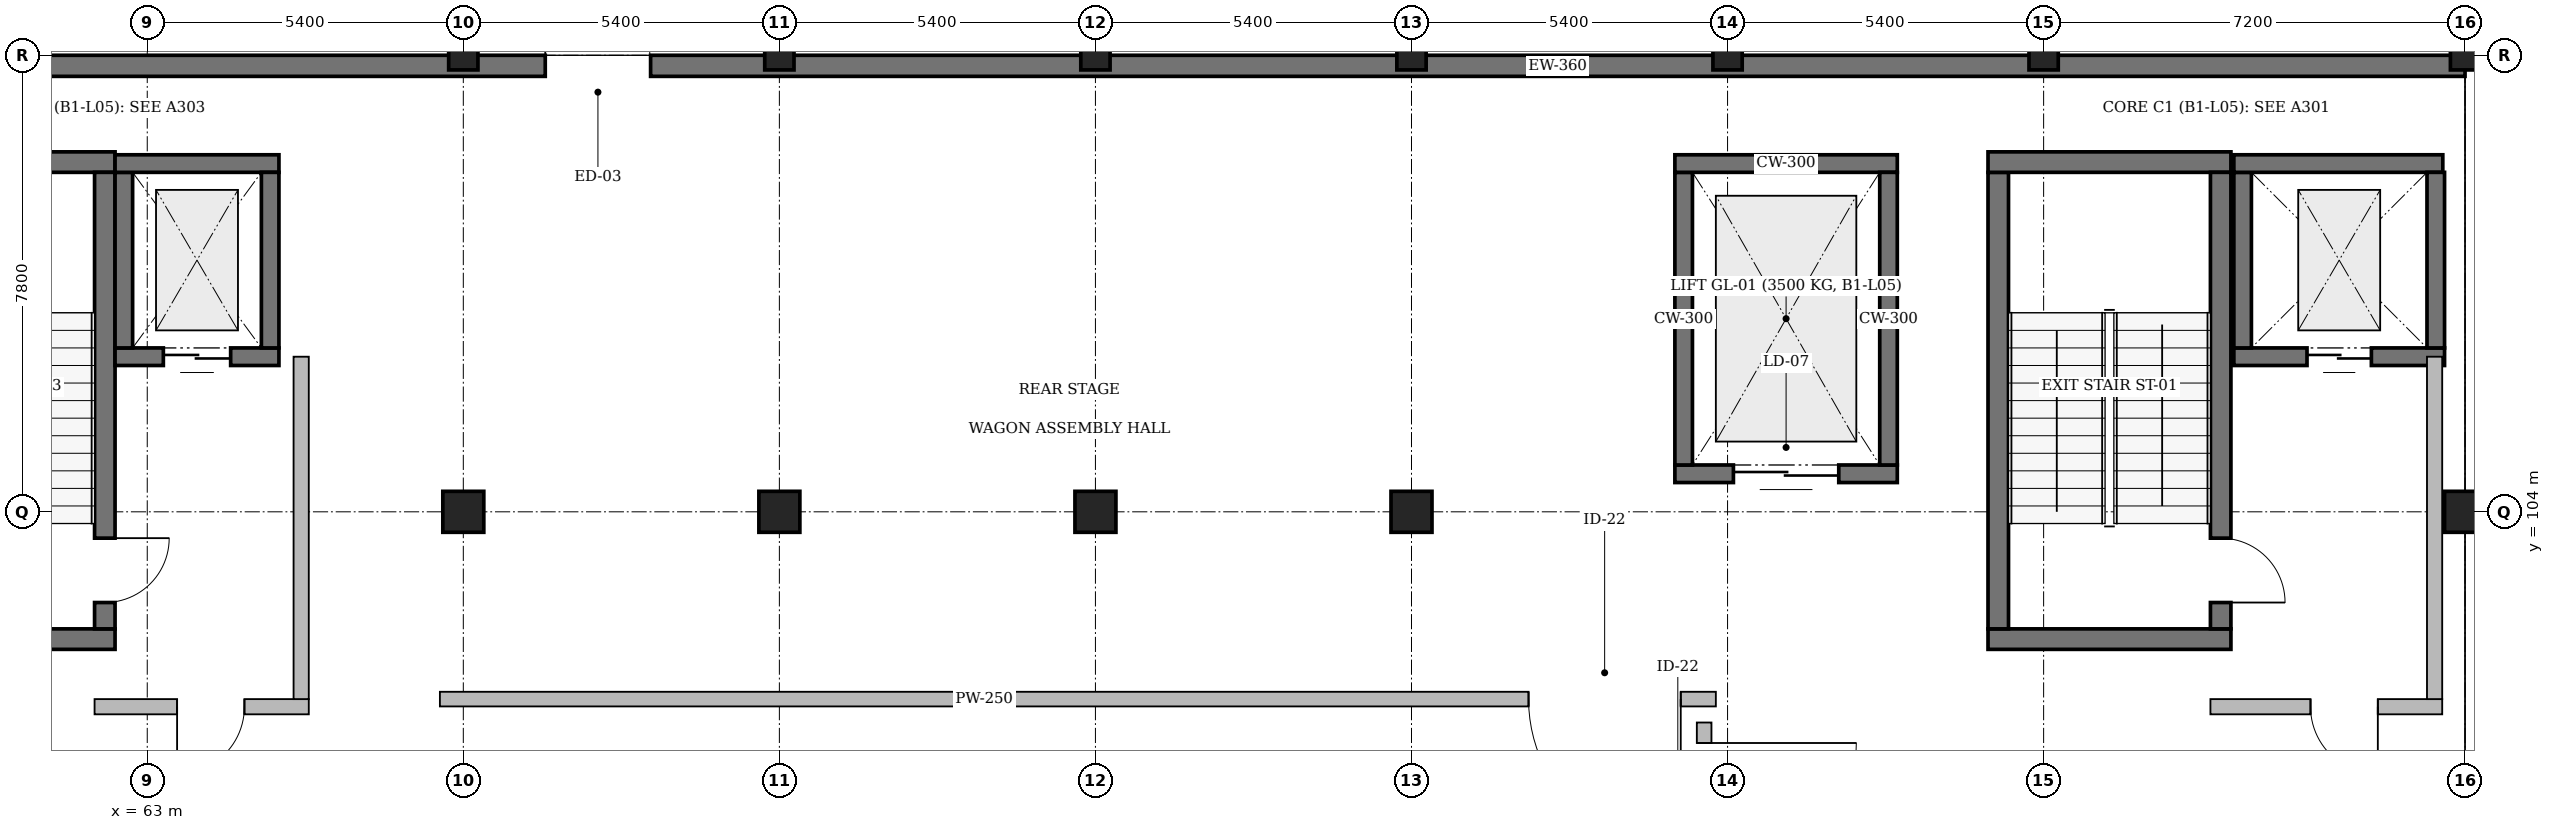
"""IFC4 building model, lengths in metres.
Left out: names, types, materials, properties, quantities, classifications, styles, units other than length and angle.
Written with IfcOpenShell. Run it as: python <this file> out.ifc"""

import sys

from ifc_helpers import new_model, si_unit, direction, frame, frame_2d, origin, origin_2d, place, context, subcontext, project, spatial, rectangle, extrude, element, fill, save


model = new_model("IFC4")
c1 = context("Model", 3, precision=1e-05, world=origin(), true_north=direction((0.0, 1.0)))
c2 = subcontext(c1, "Body", "Model", "MODEL_VIEW")
j1 = project(units=[si_unit("LENGTHUNIT", "METRE"), si_unit("PLANEANGLEUNIT", "RADIAN")], contexts=[c1])
p1 = place(None, origin())
s1 = spatial("IfcSite", under=j1, at=p1, CompositionType="ELEMENT")
p2 = place(p1, origin())
s2 = spatial("IfcBuilding", under=s1, at=p2, CompositionType="ELEMENT")
p3 = place(p2, origin())
s3 = spatial("IfcBuildingStorey", under=s2, at=p3, CompositionType="ELEMENT", Elevation=0.0)
p4 = place(p3, frame((68.4, 104.0, 0.0), z_axis=(0.0, 0.0, 1.0), x_axis=(1.0, 0.0, 0.0)))
e1 = element("IfcColumn", 1, at=p4, inside=s3, PredefinedType="COLUMN", context=c2, shape_type="SweptSolid", body=[
    extrude(rectangle(XDim=0.7, YDim=0.7, at=origin_2d()), origin(), (0.0, 0.0, 1.0), 4.8),
])
p5 = place(p3, frame((68.4, 111.8, 0.0), z_axis=(0.0, 0.0, 1.0), x_axis=(1.0, 0.0, 0.0)))
e2 = element("IfcColumn", 2, at=p5, inside=s3, PredefinedType="COLUMN", context=c2, shape_type="SweptSolid", body=[
    extrude(rectangle(XDim=0.5, YDim=0.5, at=origin_2d()), origin(), (0.0, 0.0, 1.0), 4.8),
])
p6 = place(p3, frame((73.8, 104.0, 0.0), z_axis=(0.0, 0.0, 1.0), x_axis=(1.0, 0.0, 0.0)))
e3 = element("IfcColumn", 3, at=p6, inside=s3, PredefinedType="COLUMN", context=c2, shape_type="SweptSolid", body=[
    extrude(rectangle(XDim=0.7, YDim=0.7, at=origin_2d()), origin(), (0.0, 0.0, 1.0), 4.8),
])
p7 = place(p3, frame((73.8, 111.8, 0.0), z_axis=(0.0, 0.0, 1.0), x_axis=(1.0, 0.0, 0.0)))
e4 = element("IfcColumn", 4, at=p7, inside=s3, PredefinedType="COLUMN", context=c2, shape_type="SweptSolid", body=[
    extrude(rectangle(XDim=0.5, YDim=0.5, at=origin_2d()), origin(), (0.0, 0.0, 1.0), 4.8),
])
p8 = place(p3, frame((79.2, 104.0, 0.0), z_axis=(0.0, 0.0, 1.0), x_axis=(1.0, 0.0, 0.0)))
e5 = element("IfcColumn", 5, at=p8, inside=s3, PredefinedType="COLUMN", context=c2, shape_type="SweptSolid", body=[
    extrude(rectangle(XDim=0.7, YDim=0.7, at=origin_2d()), origin(), (0.0, 0.0, 1.0), 4.8),
])
p9 = place(p3, frame((79.2, 111.8, 0.0), z_axis=(0.0, 0.0, 1.0), x_axis=(1.0, 0.0, 0.0)))
e6 = element("IfcColumn", 6, at=p9, inside=s3, PredefinedType="COLUMN", context=c2, shape_type="SweptSolid", body=[
    extrude(rectangle(XDim=0.5, YDim=0.5, at=origin_2d()), origin(), (0.0, 0.0, 1.0), 4.8),
])
p10 = place(p3, frame((84.6, 104.0, 0.0), z_axis=(0.0, 0.0, 1.0), x_axis=(1.0, 0.0, 0.0)))
e7 = element("IfcColumn", 7, at=p10, inside=s3, PredefinedType="COLUMN", context=c2, shape_type="SweptSolid", body=[
    extrude(rectangle(XDim=0.7, YDim=0.7, at=origin_2d()), origin(), (0.0, 0.0, 1.0), 4.8),
])
for number, where, z_axis, x_axis in (
    (8, (84.6, 111.8, 0.0), (0.0, 0.0, 1.0), (1.0, 0.0, 0.0)),
    (9, (90.0, 111.8, 0.0), (0.0, 0.0, 1.0), (1.0, 0.0, 0.0)),
    (10, (95.4, 111.8, 0.0), (0.0, 0.0, 1.0), (1.0, 0.0, 0.0)),
):
    element("IfcColumn", number, at=place(p3, frame(where, z_axis=z_axis, x_axis=x_axis)), inside=s3, PredefinedType="COLUMN", context=c2, shape_type="SweptSolid", body=[
        extrude(rectangle(XDim=0.5, YDim=0.5, at=origin_2d()), origin(), (0.0, 0.0, 1.0), 4.8),
    ])
p11 = place(p3, frame((102.6, 104.0, 0.0), z_axis=(0.0, 0.0, 1.0), x_axis=(1.0, 0.0, 0.0)))
e11 = element("IfcColumn", 11, at=p11, inside=s3, PredefinedType="COLUMN", context=c2, shape_type="SweptSolid", body=[
    extrude(rectangle(XDim=0.7, YDim=0.7, at=origin_2d()), origin(), (0.0, 0.0, 1.0), 4.8),
])
p12 = place(p3, frame((102.6, 111.8, 0.0), z_axis=(0.0, 0.0, 1.0), x_axis=(1.0, 0.0, 0.0)))
e12 = element("IfcColumn", 12, at=p12, inside=s3, PredefinedType="COLUMN", context=c2, shape_type="SweptSolid", body=[
    extrude(rectangle(XDim=0.5, YDim=0.5, at=origin_2d()), origin(), (0.0, 0.0, 1.0), 4.8),
])
p13 = place(p3, frame((98.6, 101.825, 0.0), z_axis=(0.0, 0.0, 1.0), x_axis=(-1.0, 0.0, 0.0)))
e13 = element("IfcWall", 13, at=p13, inside=s3, PredefinedType="SOLIDWALL", context=c2, shape_type="SweptSolid", body=[
    extrude(rectangle(XDim=4.15, YDim=0.35, at=frame_2d((2.075, 0.0))), origin(), (0.0, 0.0, 1.0), 4.8),
])
p14 = place(p3, frame((94.625, 102.0, 0.0), z_axis=(0.0, 0.0, 1.0), x_axis=(0.0, 1.0, 0.0)))
e14 = element("IfcWall", 14, at=p14, inside=s3, PredefinedType="SOLIDWALL", context=c2, shape_type="SweptSolid", body=[
    extrude(rectangle(XDim=7.8, YDim=0.35, at=frame_2d((3.9, 0.0))), origin(), (0.0, 0.0, 1.0), 4.8),
])
p15 = place(p3, frame((94.45, 109.975, 0.0), z_axis=(0.0, 0.0, 1.0), x_axis=(1.0, 0.0, 0.0)))
e15 = element("IfcWall", 15, at=p15, inside=s3, PredefinedType="SOLIDWALL", context=c2, shape_type="SweptSolid", body=[
    extrude(rectangle(XDim=4.15, YDim=0.35, at=frame_2d((2.075, 0.0))), origin(), (0.0, 0.0, 1.0), 4.8),
])
p16 = place(p3, frame((98.425, 109.8, 0.0), z_axis=(0.0, 0.0, 1.0), x_axis=(0.0, -1.0, 0.0)))
e16 = element("IfcWall", 16, at=p16, inside=s3, PredefinedType="SOLIDWALL", context=c2, shape_type="SweptSolid", body=[
    extrude(rectangle(XDim=7.8, YDim=0.35, at=frame_2d((3.9, 0.0))), origin(), (0.0, 0.0, 1.0), 4.8),
])
p17 = place(p16, frame((6.25, 0.0, 0.0)))
e17 = element("IfcOpeningElement", 17, at=p17, cuts=e16, PredefinedType="OPENING", context=c2, shape_type="SweptSolid", body=[
    extrude(rectangle(XDim=1.1, YDim=2.15, at=frame_2d((0.55, 1.075))), frame((0.0, 0.195, 0.0), z_axis=(0.0, -1.0, 0.0), x_axis=(1.0, 0.0, 0.0)), (0.0, 0.0, 1.0), 0.39),
])
p18 = place(p3, frame((102.25, 106.65, 0.0), z_axis=(0.0, 0.0, 1.0), x_axis=(-1.0, 0.0, 0.0)))
e18 = element("IfcWall", 18, at=p18, inside=s3, PredefinedType="SOLIDWALL", context=c2, shape_type="SweptSolid", body=[
    extrude(rectangle(XDim=3.6, YDim=0.3, at=frame_2d((1.8, 0.0))), origin(), (0.0, 0.0, 1.0), 4.8),
])
p19 = place(p18, frame((1.25, 0.0, 0.0)))
e19 = element("IfcOpeningElement", 19, at=p19, cuts=e18, PredefinedType="OPENING", context=c2, shape_type="SweptSolid", body=[
    extrude(rectangle(XDim=1.1, YDim=2.1, at=frame_2d((0.55, 1.05))), frame((0.0, 0.17, 0.0), z_axis=(0.0, -1.0, 0.0), x_axis=(1.0, 0.0, 0.0)), (0.0, 0.0, 1.0), 0.34),
])
p20 = place(p3, frame((98.8, 106.8, 0.0), z_axis=(0.0, 0.0, 1.0), x_axis=(0.0, 1.0, 0.0)))
e20 = element("IfcWall", 20, at=p20, inside=s3, PredefinedType="SOLIDWALL", context=c2, shape_type="SweptSolid", body=[
    extrude(rectangle(XDim=3.0, YDim=0.3, at=frame_2d((1.5, 0.0))), origin(), (0.0, 0.0, 1.0), 4.8),
])
p21 = place(p3, frame((98.65, 109.95, 0.0), z_axis=(0.0, 0.0, 1.0), x_axis=(1.0, 0.0, 0.0)))
e21 = element("IfcWall", 21, at=p21, inside=s3, PredefinedType="SOLIDWALL", context=c2, shape_type="SweptSolid", body=[
    extrude(rectangle(XDim=3.57, YDim=0.3, at=frame_2d((1.785, 0.0))), origin(), (0.0, 0.0, 1.0), 4.8),
])
p22 = place(p3, frame((102.1, 109.8, 0.0), z_axis=(0.0, 0.0, 1.0), x_axis=(0.0, -1.0, 0.0)))
e22 = element("IfcWall", 22, at=p22, inside=s3, PredefinedType="SOLIDWALL", context=c2, shape_type="SweptSolid", body=[
    extrude(rectangle(XDim=3.0, YDim=0.3, at=frame_2d((1.5, 0.0))), origin(), (0.0, 0.0, 1.0), 4.8),
])
p23 = place(p3, frame((102.21, 100.67, 0.0), z_axis=(0.0, 0.0, 1.0), x_axis=(-1.0, 0.0, 0.0)))
e23 = element("IfcWall", 23, at=p23, inside=s3, PredefinedType="SOLIDWALL", context=c2, shape_type="SweptSolid", body=[
    extrude(rectangle(XDim=3.96, YDim=0.26, at=frame_2d((1.98, 0.0))), origin(), (0.0, 0.0, 1.0), 4.54),
])
p24 = place(p23, frame((1.1, 0.0, 0.0)))
e24 = element("IfcOpeningElement", 24, at=p24, cuts=e23, PredefinedType="OPENING", context=c2, shape_type="SweptSolid", body=[
    extrude(rectangle(XDim=1.15, YDim=2.2, at=frame_2d((0.575, 1.1))), frame((0.0, 0.15, 0.0), z_axis=(0.0, -1.0, 0.0), x_axis=(1.0, 0.0, 0.0)), (0.0, 0.0, 1.0), 0.3),
])
p25 = place(p3, frame((102.08, 106.65, 0.0), z_axis=(0.0, 0.0, 1.0), x_axis=(0.0, -1.0, 0.0)))
e25 = element("IfcWall", 25, at=p25, inside=s3, PredefinedType="SOLIDWALL", context=c2, shape_type="SweptSolid", body=[
    extrude(rectangle(XDim=5.85, YDim=0.26, at=frame_2d((2.925, 0.0))), origin(), (0.0, 0.0, 1.0), 4.54),
])
for number, where, z_axis, x_axis in (
    (26, (62.45, 101.825, 0.0), (0.0, 0.0, 1.0), (-1.0, 0.0, 0.0)),
    (27, (57.96, 109.975, 0.0), (0.0, 0.0, 1.0), (1.0, 0.0, 0.0)),
):
    element("IfcWall", number, at=place(p3, frame(where, z_axis=z_axis, x_axis=x_axis)), inside=s3, PredefinedType="SOLIDWALL", context=c2, shape_type="SweptSolid", body=[
        extrude(rectangle(XDim=4.49, YDim=0.35, at=frame_2d((2.245, 0.0))), origin(), (0.0, 0.0, 1.0), 4.8),
    ])
p26 = place(p3, frame((62.275, 109.8, 0.0), z_axis=(0.0, 0.0, 1.0), x_axis=(0.0, -1.0, 0.0)))
e28 = element("IfcWall", 28, at=p26, inside=s3, PredefinedType="SOLIDWALL", context=c2, shape_type="SweptSolid", body=[
    extrude(rectangle(XDim=7.8, YDim=0.35, at=frame_2d((3.9, 0.0))), origin(), (0.0, 0.0, 1.0), 4.8),
])
p27 = place(p26, frame((6.25, 0.0, 0.0)))
e29 = element("IfcOpeningElement", 29, at=p27, cuts=e28, PredefinedType="OPENING", context=c2, shape_type="SweptSolid", body=[
    extrude(rectangle(XDim=1.1, YDim=2.15, at=frame_2d((0.55, 1.075))), frame((0.0, 0.195, 0.0), z_axis=(0.0, -1.0, 0.0), x_axis=(1.0, 0.0, 0.0)), (0.0, 0.0, 1.0), 0.39),
])
p28 = place(p3, frame((65.25, 106.65, 0.0), z_axis=(0.0, 0.0, 1.0), x_axis=(-1.0, 0.0, 0.0)))
e30 = element("IfcWall", 30, at=p28, inside=s3, PredefinedType="SOLIDWALL", context=c2, shape_type="SweptSolid", body=[
    extrude(rectangle(XDim=2.8, YDim=0.3, at=frame_2d((1.4, 0.0))), origin(), (0.0, 0.0, 1.0), 4.8),
])
p29 = place(p28, frame((0.825, 0.0, 0.0)))
e31 = element("IfcOpeningElement", 31, at=p29, cuts=e30, PredefinedType="OPENING", context=c2, shape_type="SweptSolid", body=[
    extrude(rectangle(XDim=1.15, YDim=2.1, at=frame_2d((0.575, 1.05))), frame((0.0, 0.17, 0.0), z_axis=(0.0, -1.0, 0.0), x_axis=(1.0, 0.0, 0.0)), (0.0, 0.0, 1.0), 0.34),
])
p30 = place(p3, frame((62.6, 106.8, 0.0), z_axis=(0.0, 0.0, 1.0), x_axis=(0.0, 1.0, 0.0)))
e32 = element("IfcWall", 32, at=p30, inside=s3, PredefinedType="SOLIDWALL", context=c2, shape_type="SweptSolid", body=[
    extrude(rectangle(XDim=3.0, YDim=0.3, at=frame_2d((1.5, 0.0))), origin(), (0.0, 0.0, 1.0), 4.8),
])
p31 = place(p3, frame((62.45, 109.95, 0.0), z_axis=(0.0, 0.0, 1.0), x_axis=(1.0, 0.0, 0.0)))
e33 = element("IfcWall", 33, at=p31, inside=s3, PredefinedType="SOLIDWALL", context=c2, shape_type="SweptSolid", body=[
    extrude(rectangle(XDim=2.8, YDim=0.3, at=frame_2d((1.4, 0.0))), origin(), (0.0, 0.0, 1.0), 4.8),
])
p32 = place(p3, frame((65.1, 109.8, 0.0), z_axis=(0.0, 0.0, 1.0), x_axis=(0.0, -1.0, 0.0)))
e34 = element("IfcWall", 34, at=p32, inside=s3, PredefinedType="SOLIDWALL", context=c2, shape_type="SweptSolid", body=[
    extrude(rectangle(XDim=3.0, YDim=0.3, at=frame_2d((1.5, 0.0))), origin(), (0.0, 0.0, 1.0), 4.8),
])
p33 = place(p3, frame((65.76, 100.67, 0.0), z_axis=(0.0, 0.0, 1.0), x_axis=(-1.0, 0.0, 0.0)))
e35 = element("IfcWall", 35, at=p33, inside=s3, PredefinedType="SOLIDWALL", context=c2, shape_type="SweptSolid", body=[
    extrude(rectangle(XDim=3.66, YDim=0.26, at=frame_2d((1.83, 0.0))), origin(), (0.0, 0.0, 1.0), 4.54),
])
p34 = place(p33, frame((1.1, 0.0, 0.0)))
e36 = element("IfcOpeningElement", 36, at=p34, cuts=e35, PredefinedType="OPENING", context=c2, shape_type="SweptSolid", body=[
    extrude(rectangle(XDim=1.15, YDim=2.2, at=frame_2d((0.575, 1.1))), frame((0.0, 0.15, 0.0), z_axis=(0.0, -1.0, 0.0), x_axis=(1.0, 0.0, 0.0)), (0.0, 0.0, 1.0), 0.3),
])
p35 = place(p3, frame((65.63, 106.65, 0.0), z_axis=(0.0, 0.0, 1.0), x_axis=(0.0, -1.0, 0.0)))
e37 = element("IfcWall", 37, at=p35, inside=s3, PredefinedType="SOLIDWALL", context=c2, shape_type="SweptSolid", body=[
    extrude(rectangle(XDim=5.85, YDim=0.26, at=frame_2d((2.925, 0.0))), origin(), (0.0, 0.0, 1.0), 4.54),
])
p36 = place(p3, frame((92.9, 104.65, 0.0), z_axis=(0.0, 0.0, 1.0), x_axis=(-1.0, 0.0, 0.0)))
e38 = element("IfcWall", 38, at=p36, inside=s3, PredefinedType="SOLIDWALL", context=c2, shape_type="SweptSolid", body=[
    extrude(rectangle(XDim=3.8, YDim=0.3, at=frame_2d((1.9, 0.0))), origin(), (0.0, 0.0, 1.0), 4.8),
])
p37 = place(p36, frame((1.0, 0.0, 0.0)))
e39 = element("IfcOpeningElement", 39, at=p37, cuts=e38, PredefinedType="OPENING", context=c2, shape_type="SweptSolid", body=[
    extrude(rectangle(XDim=1.8, YDim=2.4, at=frame_2d((0.9, 1.2))), frame((0.0, 0.17, 0.0), z_axis=(0.0, -1.0, 0.0), x_axis=(1.0, 0.0, 0.0)), (0.0, 0.0, 1.0), 0.34),
])
p38 = place(p3, frame((89.25, 104.8, 0.0), z_axis=(0.0, 0.0, 1.0), x_axis=(0.0, 1.0, 0.0)))
e40 = element("IfcWall", 40, at=p38, inside=s3, PredefinedType="SOLIDWALL", context=c2, shape_type="SweptSolid", body=[
    extrude(rectangle(XDim=5.0, YDim=0.3, at=frame_2d((2.5, 0.0))), origin(), (0.0, 0.0, 1.0), 4.8),
])
p39 = place(p3, frame((89.1, 109.95, 0.0), z_axis=(0.0, 0.0, 1.0), x_axis=(1.0, 0.0, 0.0)))
e41 = element("IfcWall", 41, at=p39, inside=s3, PredefinedType="SOLIDWALL", context=c2, shape_type="SweptSolid", body=[
    extrude(rectangle(XDim=3.8, YDim=0.3, at=frame_2d((1.9, 0.0))), origin(), (0.0, 0.0, 1.0), 4.8),
])
p40 = place(p3, frame((92.75, 109.8, 0.0), z_axis=(0.0, 0.0, 1.0), x_axis=(0.0, -1.0, 0.0)))
e42 = element("IfcWall", 42, at=p40, inside=s3, PredefinedType="SOLIDWALL", context=c2, shape_type="SweptSolid", body=[
    extrude(rectangle(XDim=5.0, YDim=0.3, at=frame_2d((2.5, 0.0))), origin(), (0.0, 0.0, 1.0), 4.8),
])
p41 = place(p3, frame((57.6, 111.62, 0.0), z_axis=(0.0, 0.0, 1.0), x_axis=(1.0, 0.0, 0.0)))
e43 = element("IfcWall", 43, at=p41, inside=s3, PredefinedType="SOLIDWALL", context=c2, shape_type="SweptSolid", body=[
    extrude(rectangle(XDim=45.0, YDim=0.36, at=frame_2d((22.5, 0.0))), origin(), (0.0, 0.0, 1.0), 4.54),
])
p42 = place(p41, frame((12.2, 0.0, 0.0)))
e44 = element("IfcOpeningElement", 44, at=p42, cuts=e43, PredefinedType="OPENING", context=c2, shape_type="SweptSolid", body=[
    extrude(rectangle(XDim=1.8, YDim=2.2, at=frame_2d((0.9, 1.1))), frame((0.0, 0.2, 0.0), z_axis=(0.0, -1.0, 0.0), x_axis=(1.0, 0.0, 0.0)), (0.0, 0.0, 1.0), 0.4),
])
p43 = place(p3, frame((89.6, 100.4, 0.0), z_axis=(0.0, 0.0, 1.0), x_axis=(0.0, -1.0, 0.0)))
e45 = element("IfcWall", 45, at=p43, inside=s3, PredefinedType="PARTITIONING", context=c2, shape_type="SweptSolid", body=[
    extrude(rectangle(XDim=3.83, YDim=0.25, at=frame_2d((1.915, 0.0))), origin(), (0.0, 0.0, 1.0), 4.54),
])
p44 = place(p43, frame((0.35, 0.0, 0.0)))
e46 = element("IfcOpeningElement", 46, at=p44, cuts=e45, PredefinedType="OPENING", context=c2, shape_type="SweptSolid", body=[
    extrude(rectangle(XDim=2.6, YDim=3.2, at=frame_2d((1.3, 1.6))), frame((0.0, 0.145, 0.0), z_axis=(0.0, -1.0, 0.0), x_axis=(1.0, 0.0, 0.0)), (0.0, 0.0, 1.0), 0.29),
])
p45 = place(p3, frame((89.8, 100.8, 0.0), z_axis=(0.0, 0.0, 1.0), x_axis=(-1.0, 0.0, 0.0)))
e47 = element("IfcWall", 47, at=p45, inside=s3, PredefinedType="PARTITIONING", context=c2, shape_type="SweptSolid", body=[
    extrude(rectangle(XDim=21.8, YDim=0.25, at=frame_2d((10.9, 0.0))), origin(), (0.0, 0.0, 1.0), 4.56),
])
p46 = place(p45, frame((0.6, 0.0, 0.0)))
e48 = element("IfcOpeningElement", 48, at=p46, cuts=e47, PredefinedType="OPENING", context=c2, shape_type="SweptSolid", body=[
    extrude(rectangle(XDim=2.6, YDim=3.2, at=frame_2d((1.3, 1.6))), frame((0.0, 0.145, 0.0), z_axis=(0.0, -1.0, 0.0), x_axis=(1.0, 0.0, 0.0)), (0.0, 0.0, 1.0), 0.29),
])
p47 = place(p17, origin())
e49 = element("IfcDoor", 49, at=p47, inside=s3, OperationType="SINGLE_SWING_RIGHT", PredefinedType="DOOR", context=c2, shape_type="SweptSolid", body=[
    extrude(rectangle(XDim=1.1, YDim=2.15, at=frame_2d((0.55, 1.075))), frame((0.0, 0.025, 0.0), z_axis=(0.0, -1.0, 0.0), x_axis=(1.0, 0.0, 0.0)), (0.0, 0.0, 1.0), 0.05),
])
fill(e17, e49)
p48 = place(p19, origin())
e50 = element("IfcDoor", 50, at=p48, inside=s3, OperationType="DOUBLE_DOOR_SLIDING", PredefinedType="DOOR", context=c2, shape_type="SweptSolid", body=[
    extrude(rectangle(XDim=1.1, YDim=2.1, at=frame_2d((0.55, 1.05))), frame((0.0, 0.025, 0.0), z_axis=(0.0, -1.0, 0.0), x_axis=(1.0, 0.0, 0.0)), (0.0, 0.0, 1.0), 0.05),
])
fill(e19, e50)
p49 = place(p24, origin())
e51 = element("IfcDoor", 51, at=p49, inside=s3, OperationType="SINGLE_SWING_LEFT", PredefinedType="DOOR", context=c2, shape_type="SweptSolid", body=[
    extrude(rectangle(XDim=1.15, YDim=2.2, at=frame_2d((0.575, 1.1))), frame((0.0, 0.025, 0.0), z_axis=(0.0, -1.0, 0.0), x_axis=(1.0, 0.0, 0.0)), (0.0, 0.0, 1.0), 0.05),
])
fill(e24, e51)
p50 = place(p27, origin())
e52 = element("IfcDoor", 52, at=p50, inside=s3, OperationType="SINGLE_SWING_LEFT", PredefinedType="DOOR", context=c2, shape_type="SweptSolid", body=[
    extrude(rectangle(XDim=1.1, YDim=2.15, at=frame_2d((0.55, 1.075))), frame((0.0, 0.025, 0.0), z_axis=(0.0, -1.0, 0.0), x_axis=(1.0, 0.0, 0.0)), (0.0, 0.0, 1.0), 0.05),
])
fill(e29, e52)
p51 = place(p29, origin())
e53 = element("IfcDoor", 53, at=p51, inside=s3, OperationType="DOUBLE_DOOR_SLIDING", PredefinedType="DOOR", context=c2, shape_type="SweptSolid", body=[
    extrude(rectangle(XDim=1.15, YDim=2.1, at=frame_2d((0.575, 1.05))), frame((0.0, 0.025, 0.0), z_axis=(0.0, -1.0, 0.0), x_axis=(1.0, 0.0, 0.0)), (0.0, 0.0, 1.0), 0.05),
])
fill(e31, e53)
p52 = place(p34, origin())
e54 = element("IfcDoor", 54, at=p52, inside=s3, OperationType="SINGLE_SWING_RIGHT", PredefinedType="DOOR", context=c2, shape_type="SweptSolid", body=[
    extrude(rectangle(XDim=1.15, YDim=2.2, at=frame_2d((0.575, 1.1))), frame((0.0, 0.025, 0.0), z_axis=(0.0, -1.0, 0.0), x_axis=(1.0, 0.0, 0.0)), (0.0, 0.0, 1.0), 0.05),
])
fill(e36, e54)
p53 = place(p37, origin())
e55 = element("IfcDoor", 55, at=p53, inside=s3, OperationType="DOUBLE_DOOR_SLIDING", PredefinedType="DOOR", context=c2, shape_type="SweptSolid", body=[
    extrude(rectangle(XDim=1.8, YDim=2.4, at=frame_2d((0.9, 1.2))), frame((0.0, 0.025, 0.0), z_axis=(0.0, -1.0, 0.0), x_axis=(1.0, 0.0, 0.0)), (0.0, 0.0, 1.0), 0.05),
])
fill(e39, e55)
p54 = place(p42, origin())
e56 = element("IfcDoor", 56, at=p54, inside=s3, OperationType="SINGLE_SWING_LEFT", PredefinedType="DOOR", context=c2, shape_type="SweptSolid", body=[
    extrude(rectangle(XDim=1.8, YDim=2.2, at=frame_2d((0.9, 1.1))), frame((0.0, 0.025, 0.0), z_axis=(0.0, -1.0, 0.0), x_axis=(1.0, 0.0, 0.0)), (0.0, 0.0, 1.0), 0.05),
])
fill(e44, e56)
p55 = place(p44, origin())
e57 = element("IfcDoor", 57, at=p55, inside=s3, OperationType="DOUBLE_DOOR_SINGLE_SWING", PredefinedType="DOOR", context=c2, shape_type="SweptSolid", body=[
    extrude(rectangle(XDim=2.6, YDim=3.2, at=frame_2d((1.3, 1.6))), frame((0.0, 0.025, 0.0), z_axis=(0.0, -1.0, 0.0), x_axis=(1.0, 0.0, 0.0)), (0.0, 0.0, 1.0), 0.05),
])
fill(e46, e57)
p56 = place(p46, origin())
e58 = element("IfcDoor", 58, at=p56, inside=s3, OperationType="DOUBLE_DOOR_SINGLE_SWING", PredefinedType="DOOR", context=c2, shape_type="SweptSolid", body=[
    extrude(rectangle(XDim=2.6, YDim=3.2, at=frame_2d((1.3, 1.6))), frame((0.0, 0.025, 0.0), z_axis=(0.0, -1.0, 0.0), x_axis=(1.0, 0.0, 0.0)), (0.0, 0.0, 1.0), 0.05),
])
fill(e48, e58)
save(model, sys.argv[1])
